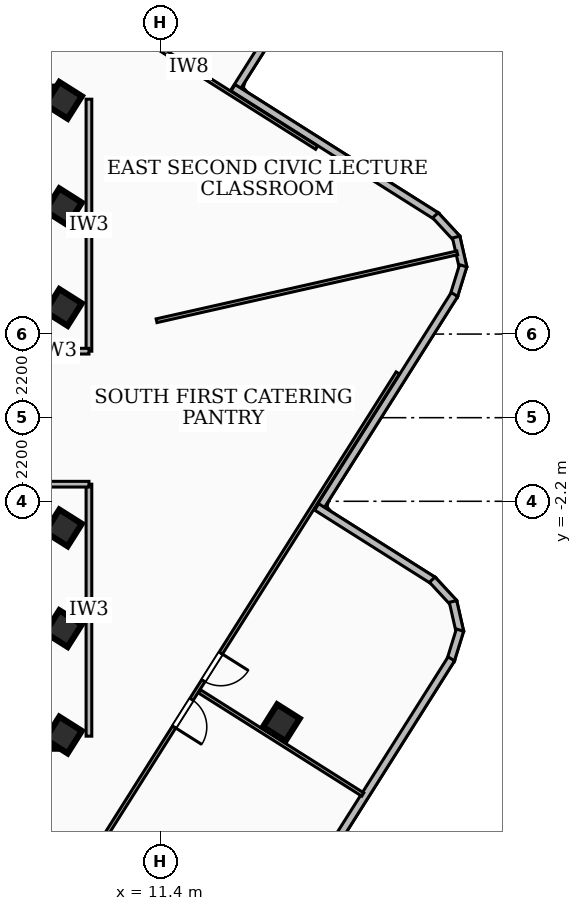
"""IFC4 building model, lengths in metres.
Left out: names, types, materials, properties, quantities, classifications, styles, units other than length and angle.
Written with IfcOpenShell. Run it as: python <this file> out.ifc"""

import sys

from ifc_helpers import new_model, si_unit, direction, frame, frame_2d, origin, origin_2d, place, context, subcontext, project, spatial, rectangle, extrude, element, fill, save


model = new_model("IFC4")
c1 = context("Model", 3, precision=1e-05, world=origin(), true_north=direction((0.0, 1.0)))
c2 = subcontext(c1, "Body", "Model", "MODEL_VIEW")
j1 = project(units=[si_unit("LENGTHUNIT", "METRE"), si_unit("PLANEANGLEUNIT", "RADIAN")], contexts=[c1])
p1 = place(None, origin())
s1 = spatial("IfcSite", under=j1, at=p1, CompositionType="ELEMENT")
p2 = place(p1, origin())
s2 = spatial("IfcBuilding", under=s1, at=p2, CompositionType="ELEMENT")
p3 = place(p2, frame((0.0, 0.0, 274.86)))
s3 = spatial("IfcBuildingStorey", under=s2, at=p3, CompositionType="ELEMENT", Elevation=274.86)
for number, where, z_axis, x_axis in (
    (1, (-8.78, 8.51, 0.0), (0.0, 0.0, 1.0), (1.0, 0.0, 0.0)),
    (2, (8.78, -8.51, 0.0), (0.0, 0.0, 1.0), (-1.0, 0.0, 0.0)),
):
    element("IfcWall", number, at=place(p3, frame(where, z_axis=z_axis, x_axis=x_axis)), inside=s3, PredefinedType="SHEAR", context=c2, shape_type="SweptSolid", body=[
        extrude(rectangle(XDim=17.56, YDim=0.4, at=frame_2d((8.78, 0.0))), origin(), (0.0, 0.0, 1.0), 3.16),
    ])
for number, where, z_axis, x_axis in (
    (3, (8.85, -5.55, 0.0), (0.0, 0.0, 1.0), (0.534, 0.845, 0.0)),
    (4, (8.85, -2.9, 0.0), (0.0, 0.0, 1.0), (0.534, 0.845, 0.0)),
    (5, (8.85, 2.9, 0.0), (0.0, 0.0, 1.0), (0.534, 0.845, 0.0)),
    (6, (8.85, 5.55, 0.0), (0.0, 0.0, 1.0), (0.534, 0.845, 0.0)),
    (7, (8.85, -8.35, 0.0), (0.0, 0.0, 1.0), (0.534, 0.845, 0.0)),
    (8, (8.85, 8.35, 0.0), (0.0, 0.0, 1.0), (0.534, 0.845, 0.0)),
    (9, (14.583, -8.026, 0.0), (0.0, 0.0, 1.0), (0.534, 0.845, 0.0)),
):
    element("IfcColumn", number, at=place(p3, frame(where, z_axis=z_axis, x_axis=x_axis)), inside=s3, PredefinedType="COLUMN", context=c2, shape_type="SweptSolid", body=[
        extrude(rectangle(XDim=0.7, YDim=0.7, at=origin_2d()), origin(), (0.0, 0.0, 1.0), 3.42),
    ])
p4 = place(p3, frame((17.74, 15.539, 0.0), z_axis=(0.0, 0.0, 1.0), x_axis=(-0.533941726163, -0.845521278893, 0.0)))
e10 = element("IfcWall", 10, at=p4, inside=s3, PredefinedType="SOLIDWALL", context=c2, shape_type="SweptSolid", body=[
    extrude(rectangle(XDim=8.242, YDim=0.2, at=frame_2d((4.121, 0.0))), origin(), (0.0, 0.0, 1.0), 3.16),
])
p5 = place(p4, frame((0.85, 0.0, 0.85)))
e11 = element("IfcOpeningElement", 11, at=p5, cuts=e10, PredefinedType="OPENING", context=c2, shape_type="SweptSolid", body=[
    extrude(rectangle(XDim=2.7, YDim=2.1, at=frame_2d((1.35, 1.05))), frame((0.0, 0.11, 0.0), z_axis=(0.0, -1.0, 0.0), x_axis=(1.0, 0.0, 0.0)), (0.0, 0.0, 1.0), 0.22),
])
p6 = place(p3, frame((13.314, 8.681, 0.0), z_axis=(0.0, 0.0, 1.0), x_axis=(0.845530066623, -0.533927810135, 0.0)))
e12 = element("IfcWall", 12, at=p6, inside=s3, PredefinedType="SOLIDWALL", context=c2, shape_type="SweptSolid", body=[
    extrude(rectangle(XDim=6.342, YDim=0.2, at=frame_2d((3.171, 0.0))), origin(), (0.0, 0.0, 1.0), 3.16),
])
p7 = place(p3, frame((18.638, 5.326, 0.0), z_axis=(0.0, 0.0, 1.0), x_axis=(0.678558613405, -0.734546260064, 0.0)))
e13 = element("IfcWall", 13, at=p7, inside=s3, PredefinedType="SOLIDWALL", context=c2, shape_type="SweptSolid", body=[
    extrude(rectangle(XDim=0.837, YDim=0.2, at=frame_2d((0.418, 0.0))), origin(), (0.0, 0.0, 1.0), 3.16),
])
p8 = place(p3, frame((19.183, 4.753, 0.0), z_axis=(0.0, 0.0, 1.0), x_axis=(0.22178748126, -0.975095027757, 0.0)))
e14 = element("IfcWall", 14, at=p8, inside=s3, PredefinedType="SOLIDWALL", context=c2, shape_type="SweptSolid", body=[
    extrude(rectangle(XDim=0.824, YDim=0.2, at=frame_2d((0.412, 0.0))), origin(), (0.0, 0.0, 1.0), 3.16),
])
p9 = place(p3, frame((19.367, 3.997, 0.0), z_axis=(0.0, 0.0, 1.0), x_axis=(-0.295803919306, -0.955248680357, 0.0)))
e15 = element("IfcWall", 15, at=p9, inside=s3, PredefinedType="SOLIDWALL", context=c2, shape_type="SweptSolid", body=[
    extrude(rectangle(XDim=0.839, YDim=0.2, at=frame_2d((0.419, 0.0))), origin(), (0.0, 0.0, 1.0), 3.16),
])
p10 = place(p3, frame((19.139, 3.241, 0.0), z_axis=(0.0, 0.0, 1.0), x_axis=(-0.534084270085, -0.845431246435, 0.0)))
e16 = element("IfcWall", 16, at=p10, inside=s3, PredefinedType="SOLIDWALL", context=c2, shape_type="SweptSolid", body=[
    extrude(rectangle(XDim=6.742, YDim=0.2, at=frame_2d((3.371, 0.0))), origin(), (0.0, 0.0, 1.0), 3.16),
])
p11 = place(p3, frame((15.513, -2.348, 0.0), z_axis=(0.0, 0.0, 1.0), x_axis=(0.8454427056, -0.534066130313, 0.0)))
e17 = element("IfcWall", 17, at=p11, inside=s3, PredefinedType="SOLIDWALL", context=c2, shape_type="SweptSolid", body=[
    extrude(rectangle(XDim=3.642, YDim=0.2, at=frame_2d((1.821, 0.0))), origin(), (0.0, 0.0, 1.0), 3.16),
])
p12 = place(p3, frame((18.554, -4.262, 0.0), z_axis=(0.0, 0.0, 1.0), x_axis=(0.679187212508, -0.73396507435, 0.0)))
e18 = element("IfcWall", 18, at=p12, inside=s3, PredefinedType="SOLIDWALL", context=c2, shape_type="SweptSolid", body=[
    extrude(rectangle(XDim=0.838, YDim=0.2, at=frame_2d((0.419, 0.0))), origin(), (0.0, 0.0, 1.0), 3.16),
])
p13 = place(p3, frame((19.1, -4.835, 0.0), z_axis=(0.0, 0.0, 1.0), x_axis=(0.222043922605, -0.975036664149, 0.0)))
e19 = element("IfcWall", 19, at=p13, inside=s3, PredefinedType="SOLIDWALL", context=c2, shape_type="SweptSolid", body=[
    extrude(rectangle(XDim=0.823, YDim=0.2, at=frame_2d((0.412, 0.0))), origin(), (0.0, 0.0, 1.0), 3.16),
])
p14 = place(p3, frame((19.284, -5.59, 0.0), z_axis=(0.0, 0.0, 1.0), x_axis=(-0.295803919306, -0.955248680357, 0.0)))
e20 = element("IfcWall", 20, at=p14, inside=s3, PredefinedType="SOLIDWALL", context=c2, shape_type="SweptSolid", body=[
    extrude(rectangle(XDim=0.839, YDim=0.2, at=frame_2d((0.419, 0.0))), origin(), (0.0, 0.0, 1.0), 3.16),
])
p15 = place(p3, frame((19.056, -6.346, 0.0), z_axis=(0.0, 0.0, 1.0), x_axis=(-0.534060804588, -0.845446069837, 0.0)))
e21 = element("IfcWall", 21, at=p15, inside=s3, PredefinedType="SOLIDWALL", context=c2, shape_type="SweptSolid", body=[
    extrude(rectangle(XDim=10.023, YDim=0.2, at=frame_2d((5.012, 0.0))), origin(), (0.0, 0.0, 1.0), 3.16),
])
p16 = place(p15, frame((6.468, 0.0, 0.85)))
e22 = element("IfcOpeningElement", 22, at=p16, cuts=e21, PredefinedType="OPENING", context=c2, shape_type="SweptSolid", body=[
    extrude(rectangle(XDim=2.7, YDim=2.1, at=frame_2d((1.35, 1.05))), frame((0.0, 0.11, 0.0), z_axis=(0.0, -1.0, 0.0), x_axis=(1.0, 0.0, 0.0)), (0.0, 0.0, 1.0), 0.22),
])
p17 = place(p3, frame((9.52, 1.75, 0.0), z_axis=(0.0, 0.0, 1.0), x_axis=(0.0, 1.0, 0.0)))
e23 = element("IfcWall", 23, at=p17, inside=s3, PredefinedType="PARTITIONING", context=c2, shape_type="SweptSolid", body=[
    extrude(rectangle(XDim=6.63, YDim=0.15, at=frame_2d((3.315, 0.0))), origin(), (0.0, 0.0, 1.0), 3.16),
])
p18 = place(p3, frame((7.85, 1.75, 0.0), z_axis=(0.0, 0.0, 1.0), x_axis=(1.0, 0.0, 0.0)))
e24 = element("IfcWall", 24, at=p18, inside=s3, PredefinedType="PARTITIONING", context=c2, shape_type="SweptSolid", body=[
    extrude(rectangle(XDim=1.67, YDim=0.15, at=frame_2d((0.835, 0.0))), origin(), (0.0, 0.0, 1.0), 2.39),
])
p19 = place(p3, frame((9.52, -8.38, 0.0), z_axis=(0.0, 0.0, 1.0), x_axis=(0.0, 1.0, 0.0)))
e25 = element("IfcWall", 25, at=p19, inside=s3, PredefinedType="PARTITIONING", context=c2, shape_type="SweptSolid", body=[
    extrude(rectangle(XDim=6.63, YDim=0.15, at=frame_2d((3.315, 0.0))), origin(), (0.0, 0.0, 1.0), 2.53),
])
p20 = place(p3, frame((7.85, -1.75, 0.0), z_axis=(0.0, 0.0, 1.0), x_axis=(1.0, 0.0, 0.0)))
e26 = element("IfcWall", 26, at=p20, inside=s3, PredefinedType="PARTITIONING", context=c2, shape_type="SweptSolid", body=[
    extrude(rectangle(XDim=1.67, YDim=0.15, at=frame_2d((0.835, 0.0))), origin(), (0.0, 0.0, 1.0), 2.39),
])
p21 = place(p3, frame((11.3, 2.551, 0.0), z_axis=(0.0, 0.0, 1.0), x_axis=(0.975452684537, 0.220209128395, 0.0)))
e27 = element("IfcWall", 27, at=p21, inside=s3, PredefinedType="PARTITIONING", context=c2, shape_type="SweptSolid", body=[
    extrude(rectangle(XDim=8.11, YDim=0.1, at=frame_2d((4.055, 0.0))), origin(), (0.0, 0.0, 1.0), 3.16),
])
p22 = place(p3, frame((15.512, 7.104, 0.0), z_axis=(0.0, 0.0, 1.0), x_axis=(-0.845450958208, 0.534053065963, 0.0)))
e28 = element("IfcWall", 28, at=p22, inside=s3, PredefinedType="PARTITIONING", context=c2, shape_type="SweptSolid", body=[
    extrude(rectangle(XDim=7.951, YDim=0.1, at=frame_2d((3.975, 0.0))), origin(), (0.0, 0.0, 1.0), 2.53),
])
p23 = place(p3, frame((12.426, -7.199, 0.0), z_axis=(0.0, 0.0, 1.0), x_axis=(0.845412458252, -0.53411400977, 0.0)))
e29 = element("IfcWall", 29, at=p23, inside=s3, PredefinedType="PARTITIONING", context=c2, shape_type="SweptSolid", body=[
    extrude(rectangle(XDim=5.085, YDim=0.1, at=frame_2d((2.542, 0.0))), origin(), (0.0, 0.0, 1.0), 2.53),
])
p24 = place(p3, frame((17.646, 1.178, 0.0), z_axis=(0.0, 0.0, 1.0), x_axis=(-0.534052309352, -0.845451436143, 0.0)))
e30 = element("IfcWall", 30, at=p24, inside=s3, PredefinedType="PARTITIONING", context=c2, shape_type="SweptSolid", body=[
    extrude(rectangle(XDim=20.44, YDim=0.1, at=frame_2d((10.22, 0.0))), origin(), (0.0, 0.0, 1.0), 2.53),
])
p25 = place(p24, frame((10.159, 0.0, 0.0)))
e31 = element("IfcOpeningElement", 31, at=p25, cuts=e30, PredefinedType="OPENING", context=c2, shape_type="SweptSolid", body=[
    extrude(rectangle(XDim=0.86, YDim=2.04, at=frame_2d((0.43, 1.02))), frame((0.0, 0.06, 0.0), z_axis=(0.0, -1.0, 0.0), x_axis=(1.0, 0.0, 0.0)), (0.0, 0.0, 1.0), 0.12),
])
p26 = place(p24, frame((8.719, 0.0, 0.0)))
e32 = element("IfcOpeningElement", 32, at=p26, cuts=e30, PredefinedType="OPENING", context=c2, shape_type="SweptSolid", body=[
    extrude(rectangle(XDim=0.86, YDim=2.04, at=frame_2d((0.43, 1.02))), frame((0.0, 0.06, 0.0), z_axis=(0.0, -1.0, 0.0), x_axis=(1.0, 0.0, 0.0)), (0.0, 0.0, 1.0), 0.12),
])
p27 = place(p25, origin())
e33 = element("IfcDoor", 33, at=p27, inside=s3, OperationType="SINGLE_SWING_RIGHT", PredefinedType="DOOR", context=c2, shape_type="SweptSolid", body=[
    extrude(rectangle(XDim=0.86, YDim=2.04, at=frame_2d((0.43, 1.02))), frame((0.0, 0.025, 0.0), z_axis=(0.0, -1.0, 0.0), x_axis=(1.0, 0.0, 0.0)), (0.0, 0.0, 1.0), 0.05),
])
fill(e31, e33)
p28 = place(p26, origin())
e34 = element("IfcDoor", 34, at=p28, inside=s3, OperationType="SINGLE_SWING_LEFT", PredefinedType="DOOR", context=c2, shape_type="SweptSolid", body=[
    extrude(rectangle(XDim=0.86, YDim=2.04, at=frame_2d((0.43, 1.02))), frame((0.0, 0.025, 0.0), z_axis=(0.0, -1.0, 0.0), x_axis=(1.0, 0.0, 0.0)), (0.0, 0.0, 1.0), 0.05),
])
fill(e32, e34)
save(model, sys.argv[1])
